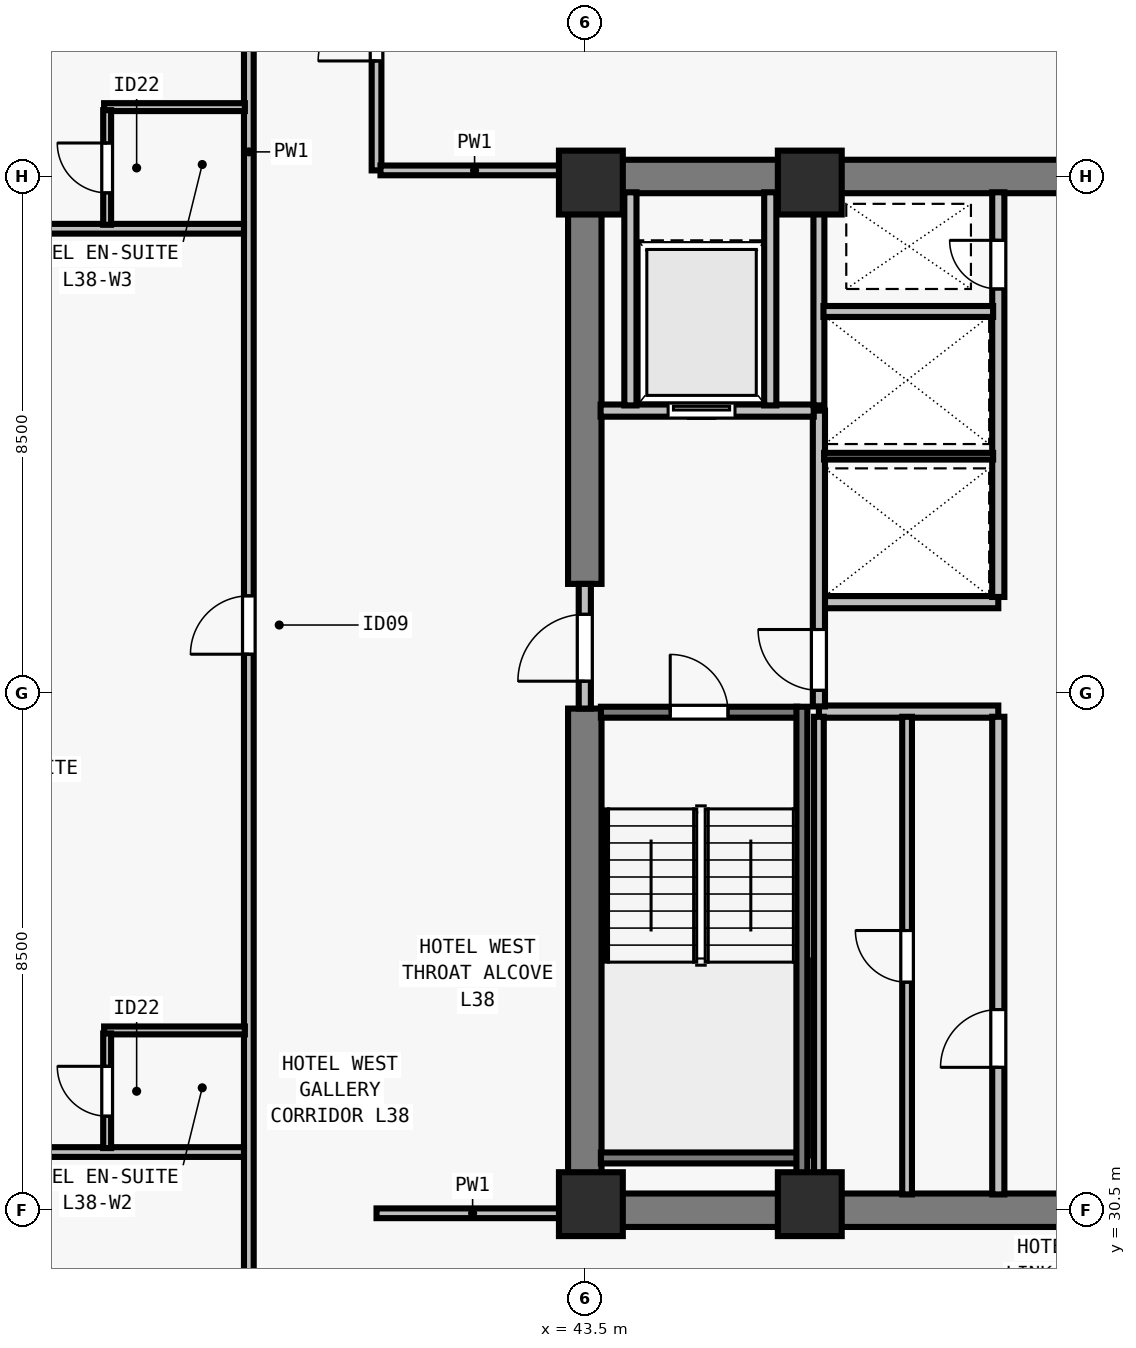
"""IFC4 building model, lengths in metres.
Left out: names, types, materials, properties, quantities, classifications, styles, units other than length and angle.
Written with IfcOpenShell. Run it as: python <this file> out.ifc"""

import sys

from ifc_helpers import new_model, si_unit, direction, frame, frame_2d, origin, origin_2d, place, context, subcontext, project, spatial, rectangle, extrude, element, fill, save


model = new_model("IFC4")
c1 = context("Model", 3, precision=1e-05, world=origin(), true_north=direction((0.0, 1.0)))
c2 = subcontext(c1, "Body", "Model", "MODEL_VIEW")
j1 = project(units=[si_unit("LENGTHUNIT", "METRE"), si_unit("PLANEANGLEUNIT", "RADIAN")], contexts=[c1])
p1 = place(None, origin())
s1 = spatial("IfcSite", under=j1, at=p1, CompositionType="ELEMENT")
p2 = place(p1, origin())
s2 = spatial("IfcBuilding", under=s1, at=p2, CompositionType="ELEMENT")
p3 = place(p2, frame((0.0, 0.0, 141.0)))
s3 = spatial("IfcBuildingStorey", under=s2, at=p3, CompositionType="ELEMENT", Elevation=141.0)
for number, where, z_axis, x_axis in (
    (1, (43.6, 30.6, 0.0), (0.0, 0.0, 1.0), (1.0, 0.0, 0.0)),
    (2, (47.2, 30.6, 0.0), (0.0, 0.0, 1.0), (1.0, 0.0, 0.0)),
    (3, (43.6, 47.4, 0.0), (0.0, 0.0, 1.0), (1.0, 0.0, 0.0)),
    (4, (47.2, 47.4, 0.0), (0.0, 0.0, 1.0), (1.0, 0.0, 0.0)),
):
    element("IfcColumn", number, at=place(p3, frame(where, z_axis=z_axis, x_axis=x_axis)), inside=s3, PredefinedType="COLUMN", context=c2, shape_type="SweptSolid", body=[
        extrude(rectangle(XDim=1.05, YDim=1.05, at=origin_2d()), origin(), (0.0, 0.0, 1.0), 3.5),
    ])
for number, where, z_axis, x_axis in (
    (5, (43.225, 30.5, 0.0), (0.0, 0.0, 1.0), (1.0, 0.0, 0.0)),
    (6, (43.225, 47.5, 0.0), (0.0, 0.0, 1.0), (1.0, 0.0, 0.0)),
):
    element("IfcWall", number, at=place(p3, frame(where, z_axis=z_axis, x_axis=x_axis)), inside=s3, PredefinedType="SHEAR", context=c2, shape_type="SweptSolid", body=[
        extrude(rectangle(XDim=17.55, YDim=0.55, at=frame_2d((8.775, 0.0))), origin(), (0.0, 0.0, 1.0), 3.28),
    ])
p4 = place(p3, frame((43.5, 30.765, 0.0), z_axis=(0.0, 0.0, 1.0), x_axis=(0.0, 1.0, 0.0)))
e7 = element("IfcWall", 7, at=p4, inside=s3, PredefinedType="SHEAR", context=c2, shape_type="SweptSolid", body=[
    extrude(rectangle(XDim=7.985, YDim=0.55, at=frame_2d((3.993, 0.0))), origin(), (0.0, 0.0, 1.0), 3.28),
])
p5 = place(p3, frame((43.5, 40.8, 0.0), z_axis=(0.0, 0.0, 1.0), x_axis=(0.0, 1.0, 0.0)))
e8 = element("IfcWall", 8, at=p5, inside=s3, PredefinedType="SHEAR", context=c2, shape_type="SweptSolid", body=[
    extrude(rectangle(XDim=6.435, YDim=0.55, at=frame_2d((3.218, 0.0))), origin(), (0.0, 0.0, 1.0), 3.28),
])
for number, where, z_axis, x_axis in (
    (9, (47.35, 38.7, 0.0), (0.0, 0.0, 1.0), (1.0, 0.0, 0.0)),
    (10, (47.35, 40.5, 0.0), (0.0, 0.0, 1.0), (1.0, 0.0, 0.0)),
):
    element("IfcWall", number, at=place(p3, frame(where, z_axis=z_axis, x_axis=x_axis)), inside=s3, PredefinedType="SOLIDWALL", context=c2, shape_type="SweptSolid", body=[
        extrude(rectangle(XDim=2.95, YDim=0.2, at=frame_2d((1.475, 0.0))), origin(), (0.0, 0.0, 1.0), 3.28),
    ])
p6 = place(p3, frame((50.3, 30.76, 0.0), z_axis=(0.0, 0.0, 1.0), x_axis=(0.0, 1.0, 0.0)))
e11 = element("IfcWall", 11, at=p6, inside=s3, PredefinedType="SOLIDWALL", context=c2, shape_type="SweptSolid", body=[
    extrude(rectangle(XDim=7.855, YDim=0.2, at=frame_2d((3.927, 0.0))), origin(), (0.0, 0.0, 1.0), 3.28),
])
p7 = place(p6, frame((2.09, 0.0, 0.0)))
e12 = element("IfcOpeningElement", 12, at=p7, cuts=e11, PredefinedType="OPENING", context=c2, shape_type="SweptSolid", body=[
    extrude(rectangle(XDim=0.95, YDim=2.12, at=frame_2d((0.475, 1.06))), frame((0.0, 0.11, 0.0), z_axis=(0.0, -1.0, 0.0), x_axis=(1.0, 0.0, 0.0)), (0.0, 0.0, 1.0), 0.22),
])
p8 = place(p3, frame((50.3, 40.585, 0.0), z_axis=(0.0, 0.0, 1.0), x_axis=(0.0, 1.0, 0.0)))
e13 = element("IfcWall", 13, at=p8, inside=s3, PredefinedType="SOLIDWALL", context=c2, shape_type="SweptSolid", body=[
    extrude(rectangle(XDim=6.655, YDim=0.2, at=frame_2d((3.328, 0.0))), origin(), (0.0, 0.0, 1.0), 3.28),
])
p9 = place(p8, frame((5.065, 0.0, 0.0)))
e14 = element("IfcOpeningElement", 14, at=p9, cuts=e13, PredefinedType="OPENING", context=c2, shape_type="SweptSolid", body=[
    extrude(rectangle(XDim=0.8, YDim=2.08, at=frame_2d((0.4, 1.04))), frame((0.0, 0.11, 0.0), z_axis=(0.0, -1.0, 0.0), x_axis=(1.0, 0.0, 0.0)), (0.0, 0.0, 1.0), 0.22),
])
p10 = place(p3, frame((43.5, 38.75, 0.0), z_axis=(0.0, 0.0, 1.0), x_axis=(0.0, 1.0, 0.0)))
e15 = element("IfcWall", 15, at=p10, inside=s3, PredefinedType="SOLIDWALL", context=c2, shape_type="SweptSolid", body=[
    extrude(rectangle(XDim=2.05, YDim=0.2, at=frame_2d((1.025, 0.0))), origin(), (0.0, 0.0, 1.0), 3.28),
])
p11 = place(p10, frame((0.45, 0.0, 0.0)))
e16 = element("IfcOpeningElement", 16, at=p11, cuts=e15, PredefinedType="OPENING", context=c2, shape_type="SweptSolid", body=[
    extrude(rectangle(XDim=1.1, YDim=2.15, at=frame_2d((0.55, 1.075))), frame((0.0, 0.11, 0.0), z_axis=(0.0, -1.0, 0.0), x_axis=(1.0, 0.0, 0.0)), (0.0, 0.0, 1.0), 0.22),
])
p12 = place(p3, frame((47.35, 38.785, 0.0), z_axis=(0.0, 0.0, 1.0), x_axis=(0.0, 1.0, 0.0)))
e17 = element("IfcWall", 17, at=p12, inside=s3, PredefinedType="SOLIDWALL", context=c2, shape_type="SweptSolid", body=[
    extrude(rectangle(XDim=4.865, YDim=0.2, at=frame_2d((2.433, 0.0))), origin(), (0.0, 0.0, 1.0), 3.28),
])
p13 = place(p12, frame((0.265, 0.0, 0.0)))
e18 = element("IfcOpeningElement", 18, at=p13, cuts=e17, PredefinedType="OPENING", context=c2, shape_type="SweptSolid", body=[
    extrude(rectangle(XDim=1.0, YDim=2.15, at=frame_2d((0.5, 1.075))), frame((0.0, 0.11, 0.0), z_axis=(0.0, -1.0, 0.0), x_axis=(1.0, 0.0, 0.0)), (0.0, 0.0, 1.0), 0.22),
])
p14 = place(p3, frame((43.76, 43.65, 0.0), z_axis=(0.0, 0.0, 1.0), x_axis=(1.0, 0.0, 0.0)))
e19 = element("IfcWall", 19, at=p14, inside=s3, PredefinedType="SOLIDWALL", context=c2, shape_type="SweptSolid", body=[
    extrude(rectangle(XDim=3.505, YDim=0.2, at=frame_2d((1.752, 0.0))), origin(), (0.0, 0.0, 1.0), 3.28),
])
p15 = place(p14, frame((1.11, 0.0, 0.0)))
e20 = element("IfcOpeningElement", 20, at=p15, cuts=e19, PredefinedType="OPENING", context=c2, shape_type="SweptSolid", body=[
    extrude(rectangle(XDim=1.1, YDim=2.2, at=frame_2d((0.55, 1.1))), frame((0.0, 0.11, 0.0), z_axis=(0.0, -1.0, 0.0), x_axis=(1.0, 0.0, 0.0)), (0.0, 0.0, 1.0), 0.22),
])
for number, where, z_axis, x_axis in (
    (21, (46.55, 43.735, 0.0), (0.0, 0.0, 1.0), (0.0, 1.0, 0.0)),
    (22, (44.25, 43.735, 0.0), (0.0, 0.0, 1.0), (0.0, 1.0, 0.0)),
):
    element("IfcWall", number, at=place(p3, frame(where, z_axis=z_axis, x_axis=x_axis)), inside=s3, PredefinedType="SOLIDWALL", context=c2, shape_type="SweptSolid", body=[
        extrude(rectangle(XDim=3.505, YDim=0.2, at=frame_2d((1.752, 0.0))), origin(), (0.0, 0.0, 1.0), 3.28),
    ])
p16 = place(p3, frame((47.35, 30.76, 0.0), z_axis=(0.0, 0.0, 1.0), x_axis=(0.0, 1.0, 0.0)))
e23 = element("IfcWall", 23, at=p16, inside=s3, PredefinedType="PARTITIONING", context=c2, shape_type="SweptSolid", body=[
    extrude(rectangle(XDim=7.855, YDim=0.16, at=frame_2d((3.927, 0.0))), origin(), (0.0, 0.0, 1.0), 3.28),
])
p17 = place(p3, frame((48.8, 30.76, 0.0), z_axis=(0.0, 0.0, 1.0), x_axis=(0.0, 1.0, 0.0)))
e24 = element("IfcWall", 24, at=p17, inside=s3, PredefinedType="PARTITIONING", context=c2, shape_type="SweptSolid", body=[
    extrude(rectangle(XDim=7.855, YDim=0.16, at=frame_2d((3.927, 0.0))), origin(), (0.0, 0.0, 1.0), 3.28),
])
p18 = place(p17, frame((3.49, 0.0, 0.0)))
e25 = element("IfcOpeningElement", 25, at=p18, cuts=e24, PredefinedType="OPENING", context=c2, shape_type="SweptSolid", body=[
    extrude(rectangle(XDim=0.85, YDim=2.12, at=frame_2d((0.425, 1.06))), frame((0.0, 0.09, 0.0), z_axis=(0.0, -1.0, 0.0), x_axis=(1.0, 0.0, 0.0)), (0.0, 0.0, 1.0), 0.18),
])
p19 = place(p3, frame((47.35, 43.735, 0.0), z_axis=(0.0, 0.0, 1.0), x_axis=(0.0, 1.0, 0.0)))
e26 = element("IfcWall", 26, at=p19, inside=s3, PredefinedType="SOLIDWALL", context=c2, shape_type="SweptSolid", body=[
    extrude(rectangle(XDim=3.505, YDim=0.18, at=frame_2d((1.752, 0.0))), origin(), (0.0, 0.0, 1.0), 3.28),
])
p20 = place(p3, frame((47.435, 42.9, 0.0), z_axis=(0.0, 0.0, 1.0), x_axis=(1.0, 0.0, 0.0)))
e27 = element("IfcWall", 27, at=p20, inside=s3, PredefinedType="PARTITIONING", context=c2, shape_type="SweptSolid", body=[
    extrude(rectangle(XDim=2.78, YDim=0.11, at=frame_2d((1.39, 0.0))), origin(), (0.0, 0.0, 1.0), 3.28),
])
p21 = place(p3, frame((47.425, 45.28, 0.0), z_axis=(0.0, 0.0, 1.0), x_axis=(1.0, 0.0, 0.0)))
e28 = element("IfcWall", 28, at=p21, inside=s3, PredefinedType="SOLIDWALL", context=c2, shape_type="SweptSolid", body=[
    extrude(rectangle(XDim=2.79, YDim=0.18, at=frame_2d((1.395, 0.0))), origin(), (0.0, 0.0, 1.0), 3.28),
])
p22 = place(p3, frame((37.975, 15.325, 0.0), z_axis=(0.0, 0.0, 1.0), x_axis=(0.0, 1.0, 0.0)))
e29 = element("IfcWall", 29, at=p22, inside=s3, PredefinedType="PARTITIONING", context=c2, shape_type="SweptSolid", body=[
    extrude(rectangle(XDim=47.35, YDim=0.16, at=frame_2d((23.675, 0.0))), origin(), (0.0, 0.0, 1.0), 2.555),
])
p23 = place(p22, frame((8.934, 0.0, 0.0)))
e30 = element("IfcOpeningElement", 30, at=p23, cuts=e29, PredefinedType="OPENING", context=c2, shape_type="SweptSolid", body=[
    extrude(rectangle(XDim=0.96, YDim=2.15, at=frame_2d((0.48, 1.075))), frame((0.0, 0.09, 0.0), z_axis=(0.0, -1.0, 0.0), x_axis=(1.0, 0.0, 0.0)), (0.0, 0.0, 1.0), 0.18),
])
p24 = place(p22, frame((24.319, 0.0, 0.0)))
e31 = element("IfcOpeningElement", 31, at=p24, cuts=e29, PredefinedType="OPENING", context=c2, shape_type="SweptSolid", body=[
    extrude(rectangle(XDim=0.96, YDim=2.15, at=frame_2d((0.48, 1.075))), frame((0.0, 0.09, 0.0), z_axis=(0.0, -1.0, 0.0), x_axis=(1.0, 0.0, 0.0)), (0.0, 0.0, 1.0), 0.18),
])
p25 = place(p22, frame((39.88, 0.0, 0.0)))
e32 = element("IfcOpeningElement", 32, at=p25, cuts=e29, PredefinedType="OPENING", context=c2, shape_type="SweptSolid", body=[
    extrude(rectangle(XDim=0.96, YDim=2.15, at=frame_2d((0.48, 1.075))), frame((0.0, 0.09, 0.0), z_axis=(0.0, -1.0, 0.0), x_axis=(1.0, 0.0, 0.0)), (0.0, 0.0, 1.0), 0.18),
])
p26 = place(p3, frame((40.075, 47.6, 0.0), z_axis=(0.0, 0.0, 1.0), x_axis=(0.0, 1.0, 0.0)))
e33 = element("IfcWall", 33, at=p26, inside=s3, PredefinedType="PARTITIONING", context=c2, shape_type="SweptSolid", body=[
    extrude(rectangle(XDim=15.075, YDim=0.16, at=frame_2d((7.538, 0.0))), origin(), (0.0, 0.0, 1.0), 2.555),
])
p27 = place(p26, frame((1.8, 0.0, 0.0)))
e34 = element("IfcOpeningElement", 34, at=p27, cuts=e33, PredefinedType="OPENING", context=c2, shape_type="SweptSolid", body=[
    extrude(rectangle(XDim=0.96, YDim=2.12, at=frame_2d((0.48, 1.06))), frame((0.0, 0.09, 0.0), z_axis=(0.0, -1.0, 0.0), x_axis=(1.0, 0.0, 0.0)), (0.0, 0.0, 1.0), 0.18),
])
p28 = place(p3, frame((40.075, 30.45, 0.0), z_axis=(0.0, 0.0, 1.0), x_axis=(1.0, 0.0, 0.0)))
e35 = element("IfcWall", 35, at=p28, inside=s3, PredefinedType="PARTITIONING", context=c2, shape_type="SweptSolid", body=[
    extrude(rectangle(XDim=3.16, YDim=0.16, at=frame_2d((1.58, 0.0))), origin(), (0.0, 0.0, 1.0), 3.28),
])
p29 = place(p3, frame((40.14, 47.6, 0.0), z_axis=(0.0, 0.0, 1.0), x_axis=(1.0, 0.0, 0.0)))
e36 = element("IfcWall", 36, at=p29, inside=s3, PredefinedType="PARTITIONING", context=c2, shape_type="SweptSolid", body=[
    extrude(rectangle(XDim=3.095, YDim=0.16, at=frame_2d((1.548, 0.0))), origin(), (0.0, 0.0, 1.0), 3.28),
])
p30 = place(p3, frame((28.325, 31.457, 0.0), z_axis=(0.0, 0.0, 1.0), x_axis=(1.0, 0.0, 0.0)))
e37 = element("IfcWall", 37, at=p30, inside=s3, PredefinedType="PARTITIONING", context=c2, shape_type="SweptSolid", body=[
    extrude(rectangle(XDim=9.57, YDim=0.16, at=frame_2d((4.785, 0.0))), origin(), (0.0, 0.0, 1.0), 3.28),
])
p31 = place(p3, frame((35.595, 33.457, 0.0), z_axis=(0.0, 0.0, 1.0), x_axis=(1.0, 0.0, 0.0)))
e38 = element("IfcWall", 38, at=p31, inside=s3, PredefinedType="PLUMBINGWALL", context=c2, shape_type="SweptSolid", body=[
    extrude(rectangle(XDim=2.315, YDim=0.13, at=frame_2d((1.157, 0.0))), origin(), (0.0, 0.0, 1.0), 3.28),
])
p32 = place(p3, frame((35.645, 31.522, 0.0), z_axis=(0.0, 0.0, 1.0), x_axis=(0.0, 1.0, 0.0)))
e39 = element("IfcWall", 39, at=p32, inside=s3, PredefinedType="PLUMBINGWALL", context=c2, shape_type="SweptSolid", body=[
    extrude(rectangle(XDim=1.885, YDim=0.13, at=frame_2d((0.942, 0.0))), origin(), (0.0, 0.0, 1.0), 3.28),
])
p33 = place(p32, frame((0.525, 0.0, 0.0)))
e40 = element("IfcOpeningElement", 40, at=p33, cuts=e39, PredefinedType="OPENING", context=c2, shape_type="SweptSolid", body=[
    extrude(rectangle(XDim=0.82, YDim=2.1, at=frame_2d((0.41, 1.05))), frame((0.0, 0.075, 0.0), z_axis=(0.0, -1.0, 0.0), x_axis=(1.0, 0.0, 0.0)), (0.0, 0.0, 1.0), 0.15),
])
p34 = place(p3, frame((28.325, 46.641, 0.0), z_axis=(0.0, 0.0, 1.0), x_axis=(1.0, 0.0, 0.0)))
e41 = element("IfcWall", 41, at=p34, inside=s3, PredefinedType="PARTITIONING", context=c2, shape_type="SweptSolid", body=[
    extrude(rectangle(XDim=9.57, YDim=0.16, at=frame_2d((4.785, 0.0))), origin(), (0.0, 0.0, 1.0), 3.28),
])
p35 = place(p3, frame((35.595, 48.641, 0.0), z_axis=(0.0, 0.0, 1.0), x_axis=(1.0, 0.0, 0.0)))
e42 = element("IfcWall", 42, at=p35, inside=s3, PredefinedType="PLUMBINGWALL", context=c2, shape_type="SweptSolid", body=[
    extrude(rectangle(XDim=2.315, YDim=0.13, at=frame_2d((1.157, 0.0))), origin(), (0.0, 0.0, 1.0), 3.28),
])
p36 = place(p3, frame((35.645, 46.706, 0.0), z_axis=(0.0, 0.0, 1.0), x_axis=(0.0, 1.0, 0.0)))
e43 = element("IfcWall", 43, at=p36, inside=s3, PredefinedType="PLUMBINGWALL", context=c2, shape_type="SweptSolid", body=[
    extrude(rectangle(XDim=1.885, YDim=0.13, at=frame_2d((0.942, 0.0))), origin(), (0.0, 0.0, 1.0), 3.28),
])
p37 = place(p36, frame((0.525, 0.0, 0.0)))
e44 = element("IfcOpeningElement", 44, at=p37, cuts=e43, PredefinedType="OPENING", context=c2, shape_type="SweptSolid", body=[
    extrude(rectangle(XDim=0.82, YDim=2.1, at=frame_2d((0.41, 1.05))), frame((0.0, 0.075, 0.0), z_axis=(0.0, -1.0, 0.0), x_axis=(1.0, 0.0, 0.0)), (0.0, 0.0, 1.0), 0.15),
])
p38 = place(p3, frame((43.765, 38.69, 0.0), z_axis=(0.0, 0.0, 1.0), x_axis=(1.0, 0.0, 0.0)))
e45 = element("IfcWall", 45, at=p38, inside=s3, PredefinedType="SOLIDWALL", context=c2, shape_type="SweptSolid", body=[
    extrude(rectangle(XDim=3.23, YDim=0.18, at=frame_2d((1.615, 0.0))), origin(), (0.0, 0.0, 1.0), 3.28),
])
p39 = place(p38, frame((1.14, 0.0, 0.0)))
e46 = element("IfcOpeningElement", 46, at=p39, cuts=e45, PredefinedType="OPENING", context=c2, shape_type="SweptSolid", body=[
    extrude(rectangle(XDim=0.95, YDim=2.15, at=frame_2d((0.475, 1.075))), frame((0.0, 0.1, 0.0), z_axis=(0.0, -1.0, 0.0), x_axis=(1.0, 0.0, 0.0)), (0.0, 0.0, 1.0), 0.2),
])
p40 = place(p3, frame((43.765, 31.36, 0.0), z_axis=(0.0, 0.0, 1.0), x_axis=(1.0, 0.0, 0.0)))
e47 = element("IfcWall", 47, at=p40, inside=s3, PredefinedType="SOLIDWALL", context=c2, shape_type="SweptSolid", body=[
    extrude(rectangle(XDim=3.23, YDim=0.18, at=frame_2d((1.615, 0.0))), origin(), (0.0, 0.0, 1.0), 3.28),
])
p41 = place(p3, frame((47.07, 38.78, 0.0), z_axis=(0.0, 0.0, 1.0), x_axis=(0.0, -1.0, 0.0)))
e48 = element("IfcWall", 48, at=p41, inside=s3, PredefinedType="SOLIDWALL", context=c2, shape_type="SweptSolid", body=[
    extrude(rectangle(XDim=8.017, YDim=0.18, at=frame_2d((4.009, 0.0))), origin(), (0.0, 0.0, 1.0), 3.28),
])
p42 = place(p11, origin())
e49 = element("IfcDoor", 49, at=p42, inside=s3, OperationType="SINGLE_SWING_LEFT", PredefinedType="DOOR", context=c2, shape_type="SweptSolid", body=[
    extrude(rectangle(XDim=1.1, YDim=2.15, at=frame_2d((0.55, 1.075))), frame((0.0, 0.025, 0.0), z_axis=(0.0, -1.0, 0.0), x_axis=(1.0, 0.0, 0.0)), (0.0, 0.0, 1.0), 0.05),
])
fill(e16, e49)
p43 = place(p13, origin())
e50 = element("IfcDoor", 50, at=p43, inside=s3, OperationType="SINGLE_SWING_RIGHT", PredefinedType="DOOR", context=c2, shape_type="SweptSolid", body=[
    extrude(rectangle(XDim=1.0, YDim=2.15, at=frame_2d((0.5, 1.075))), frame((0.0, 0.025, 0.0), z_axis=(0.0, -1.0, 0.0), x_axis=(1.0, 0.0, 0.0)), (0.0, 0.0, 1.0), 0.05),
])
fill(e18, e50)
p44 = place(p15, origin())
e51 = element("IfcDoor", 51, at=p44, inside=s3, OperationType="SLIDING_TO_LEFT", PredefinedType="DOOR", context=c2, shape_type="SweptSolid", body=[
    extrude(rectangle(XDim=1.1, YDim=2.2, at=frame_2d((0.55, 1.1))), frame((0.0, 0.025, 0.0), z_axis=(0.0, -1.0, 0.0), x_axis=(1.0, 0.0, 0.0)), (0.0, 0.0, 1.0), 0.05),
])
fill(e20, e51)
p45 = place(p7, origin())
e52 = element("IfcDoor", 52, at=p45, inside=s3, OperationType="SINGLE_SWING_LEFT", PredefinedType="DOOR", context=c2, shape_type="SweptSolid", body=[
    extrude(rectangle(XDim=0.95, YDim=2.12, at=frame_2d((0.475, 1.06))), frame((0.0, 0.025, 0.0), z_axis=(0.0, -1.0, 0.0), x_axis=(1.0, 0.0, 0.0)), (0.0, 0.0, 1.0), 0.05),
])
fill(e12, e52)
p46 = place(p18, origin())
e53 = element("IfcDoor", 53, at=p46, inside=s3, OperationType="SINGLE_SWING_RIGHT", PredefinedType="DOOR", context=c2, shape_type="SweptSolid", body=[
    extrude(rectangle(XDim=0.85, YDim=2.12, at=frame_2d((0.425, 1.06))), frame((0.0, 0.025, 0.0), z_axis=(0.0, -1.0, 0.0), x_axis=(1.0, 0.0, 0.0)), (0.0, 0.0, 1.0), 0.05),
])
fill(e25, e53)
p47 = place(p9, origin())
e54 = element("IfcDoor", 54, at=p47, inside=s3, OperationType="SINGLE_SWING_RIGHT", PredefinedType="DOOR", context=c2, shape_type="SweptSolid", body=[
    extrude(rectangle(XDim=0.8, YDim=2.08, at=frame_2d((0.4, 1.04))), frame((0.0, 0.025, 0.0), z_axis=(0.0, -1.0, 0.0), x_axis=(1.0, 0.0, 0.0)), (0.0, 0.0, 1.0), 0.05),
])
fill(e14, e54)
p48 = place(p27, origin())
e55 = element("IfcDoor", 55, at=p48, inside=s3, OperationType="SINGLE_SWING_LEFT", PredefinedType="DOOR", context=c2, shape_type="SweptSolid", body=[
    extrude(rectangle(XDim=0.96, YDim=2.12, at=frame_2d((0.48, 1.06))), frame((0.0, 0.025, 0.0), z_axis=(0.0, -1.0, 0.0), x_axis=(1.0, 0.0, 0.0)), (0.0, 0.0, 1.0), 0.05),
])
fill(e34, e55)
p49 = place(p33, origin())
e56 = element("IfcDoor", 56, at=p49, inside=s3, OperationType="SINGLE_SWING_RIGHT", PredefinedType="DOOR", context=c2, shape_type="SweptSolid", body=[
    extrude(rectangle(XDim=0.82, YDim=2.1, at=frame_2d((0.41, 1.05))), frame((0.0, 0.025, 0.0), z_axis=(0.0, -1.0, 0.0), x_axis=(1.0, 0.0, 0.0)), (0.0, 0.0, 1.0), 0.05),
])
fill(e40, e56)
p50 = place(p24, origin())
e57 = element("IfcDoor", 57, at=p50, inside=s3, OperationType="SINGLE_SWING_LEFT", PredefinedType="DOOR", context=c2, shape_type="SweptSolid", body=[
    extrude(rectangle(XDim=0.96, YDim=2.15, at=frame_2d((0.48, 1.075))), frame((0.0, 0.025, 0.0), z_axis=(0.0, -1.0, 0.0), x_axis=(1.0, 0.0, 0.0)), (0.0, 0.0, 1.0), 0.05),
])
fill(e31, e57)
p51 = place(p37, origin())
e58 = element("IfcDoor", 58, at=p51, inside=s3, OperationType="SINGLE_SWING_RIGHT", PredefinedType="DOOR", context=c2, shape_type="SweptSolid", body=[
    extrude(rectangle(XDim=0.82, YDim=2.1, at=frame_2d((0.41, 1.05))), frame((0.0, 0.025, 0.0), z_axis=(0.0, -1.0, 0.0), x_axis=(1.0, 0.0, 0.0)), (0.0, 0.0, 1.0), 0.05),
])
fill(e44, e58)
p52 = place(p39, origin())
e59 = element("IfcDoor", 59, at=p52, inside=s3, OperationType="SINGLE_SWING_LEFT", PredefinedType="DOOR", context=c2, shape_type="SweptSolid", body=[
    extrude(rectangle(XDim=0.95, YDim=2.15, at=frame_2d((0.475, 1.075))), frame((0.0, 0.025, 0.0), z_axis=(0.0, -1.0, 0.0), x_axis=(1.0, 0.0, 0.0)), (0.0, 0.0, 1.0), 0.05),
])
fill(e46, e59)
save(model, sys.argv[1])
